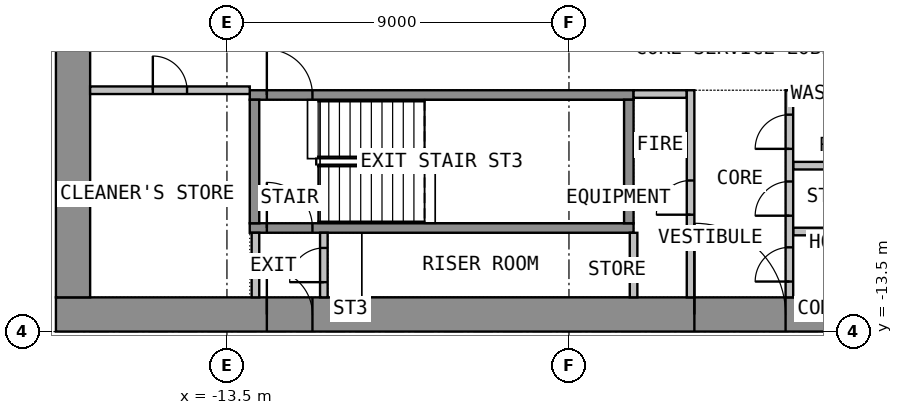
"""IFC4 building model, lengths in metres.
Left out: names, types, materials, properties, quantities, classifications, styles, units other than length and angle.
Written with IfcOpenShell. Run it as: python <this file> out.ifc"""

import sys

from ifc_helpers import new_model, si_unit, direction, frame, frame_2d, origin, place, context, subcontext, project, spatial, rectangle, extrude, element, fill, save


model = new_model("IFC4")
c1 = context("Model", 3, precision=1e-05, world=origin(), true_north=direction((0.0, 1.0)))
c2 = subcontext(c1, "Body", "Model", "MODEL_VIEW")
j1 = project(units=[si_unit("LENGTHUNIT", "METRE"), si_unit("PLANEANGLEUNIT", "RADIAN")], contexts=[c1])
p1 = place(None, origin())
s1 = spatial("IfcSite", under=j1, at=p1, CompositionType="ELEMENT")
p2 = place(p1, origin())
s2 = spatial("IfcBuilding", under=s1, at=p2, CompositionType="ELEMENT")
p3 = place(p2, frame((0.0, 0.0, 30.0)))
s3 = spatial("IfcBuildingStorey", under=s2, at=p3, CompositionType="ELEMENT", Elevation=30.0)
p4 = place(p3, frame((-18.0, -13.05, 0.0), z_axis=(0.0, 0.0, 1.0), x_axis=(1.0, 0.0, 0.0)))
e1 = element("IfcWall", 1, at=p4, inside=s3, PredefinedType="SHEAR", context=c2, shape_type="SweptSolid", body=[
    extrude(rectangle(XDim=36.0, YDim=0.9, at=frame_2d((18.0, 0.0))), origin(), (0.0, 0.0, 1.0), 3.525),
])
p5 = place(p4, frame((16.8, 0.0, 0.0)))
e2 = element("IfcOpeningElement", 2, at=p5, cuts=e1, PredefinedType="OPENING", context=c2, shape_type="SweptSolid", body=[
    extrude(rectangle(XDim=2.4, YDim=2.1, at=frame_2d((1.2, 1.05))), frame((0.0, 0.46, 0.0), z_axis=(0.0, -1.0, 0.0), x_axis=(1.0, 0.0, 0.0)), (0.0, 0.0, 1.0), 0.92),
])
p6 = place(p4, frame((5.55, 0.0, 0.0)))
e3 = element("IfcOpeningElement", 3, at=p6, cuts=e1, PredefinedType="OPENING", context=c2, shape_type="SweptSolid", body=[
    extrude(rectangle(XDim=1.2, YDim=2.1, at=frame_2d((0.6, 1.05))), frame((0.0, 0.46, 0.0), z_axis=(0.0, -1.0, 0.0), x_axis=(1.0, 0.0, 0.0)), (0.0, 0.0, 1.0), 0.92),
])
p7 = place(p4, frame((29.25, 0.0, 0.0)))
e4 = element("IfcOpeningElement", 4, at=p7, cuts=e1, PredefinedType="OPENING", context=c2, shape_type="SweptSolid", body=[
    extrude(rectangle(XDim=1.2, YDim=2.1, at=frame_2d((0.6, 1.05))), frame((0.0, 0.46, 0.0), z_axis=(0.0, -1.0, 0.0), x_axis=(1.0, 0.0, 0.0)), (0.0, 0.0, 1.0), 0.92),
])
p8 = place(p3, frame((-17.55, -12.6, 0.0), z_axis=(0.0, 0.0, 1.0), x_axis=(0.0, 1.0, 0.0)))
e5 = element("IfcWall", 5, at=p8, inside=s3, PredefinedType="SHEAR", context=c2, shape_type="SweptSolid", body=[
    extrude(rectangle(XDim=25.2, YDim=0.9, at=frame_2d((12.6, 0.0))), origin(), (0.0, 0.0, 1.0), 3.525),
])
p9 = place(p8, frame((11.4, 0.0, 0.0)))
e6 = element("IfcOpeningElement", 6, at=p9, cuts=e5, PredefinedType="OPENING", context=c2, shape_type="SweptSolid", body=[
    extrude(rectangle(XDim=2.4, YDim=2.1, at=frame_2d((1.2, 1.05))), frame((0.0, 0.46, 0.0), z_axis=(0.0, -1.0, 0.0), x_axis=(1.0, 0.0, 0.0)), (0.0, 0.0, 1.0), 0.92),
])
p10 = place(p3, frame((-12.9, -10.775, 0.0), z_axis=(0.0, 0.0, 1.0), x_axis=(1.0, 0.0, 0.0)))
e7 = element("IfcWall", 7, at=p10, inside=s3, PredefinedType="SHEAR", context=c2, shape_type="SweptSolid", body=[
    extrude(rectangle(XDim=10.1, YDim=0.25, at=frame_2d((5.05, 0.0))), origin(), (0.0, 0.0, 1.0), 3.525),
])
p11 = place(p10, frame((0.45, 0.0, 0.0)))
e8 = element("IfcOpeningElement", 8, at=p11, cuts=e7, PredefinedType="OPENING", context=c2, shape_type="SweptSolid", body=[
    extrude(rectangle(XDim=1.2, YDim=2.1, at=frame_2d((0.6, 1.05))), frame((0.0, 0.135, 0.0), z_axis=(0.0, -1.0, 0.0), x_axis=(1.0, 0.0, 0.0)), (0.0, 0.0, 1.0), 0.27),
])
p12 = place(p3, frame((-12.9, -7.275, 0.0), z_axis=(0.0, 0.0, 1.0), x_axis=(1.0, 0.0, 0.0)))
e9 = element("IfcWall", 9, at=p12, inside=s3, PredefinedType="SHEAR", context=c2, shape_type="SweptSolid", body=[
    extrude(rectangle(XDim=10.1, YDim=0.25, at=frame_2d((5.05, 0.0))), origin(), (0.0, 0.0, 1.0), 3.525),
])
p13 = place(p12, frame((0.45, 0.0, 0.0)))
e10 = element("IfcOpeningElement", 10, at=p13, cuts=e9, PredefinedType="OPENING", context=c2, shape_type="SweptSolid", body=[
    extrude(rectangle(XDim=1.2, YDim=2.1, at=frame_2d((0.6, 1.05))), frame((0.0, 0.135, 0.0), z_axis=(0.0, -1.0, 0.0), x_axis=(1.0, 0.0, 0.0)), (0.0, 0.0, 1.0), 0.27),
])
for number, where, z_axis, x_axis in (
    (11, (-12.775, -10.65, 0.0), (0.0, 0.0, 1.0), (0.0, 1.0, 0.0)),
    (12, (-2.925, -10.65, 0.0), (0.0, 0.0, 1.0), (0.0, 1.0, 0.0)),
):
    element("IfcWall", number, at=place(p3, frame(where, z_axis=z_axis, x_axis=x_axis)), inside=s3, PredefinedType="SHEAR", context=c2, shape_type="SweptSolid", body=[
        extrude(rectangle(XDim=3.25, YDim=0.25, at=frame_2d((1.625, 0.0))), origin(), (0.0, 0.0, 1.0), 3.525),
    ])
for number, where, z_axis, x_axis in (
    (13, (-2.8, -7.25, 0.0), (0.0, 0.0, 1.0), (1.0, 0.0, 0.0)),
    (14, (1.4, -7.25, 0.0), (0.0, 0.0, 1.0), (1.0, 0.0, 0.0)),
    (15, (1.4, -9.135, 0.0), (0.0, 0.0, 1.0), (1.0, 0.0, 0.0)),
    (16, (1.4, -10.867, 0.0), (0.0, 0.0, 1.0), (1.0, 0.0, 0.0)),
):
    element("IfcWall", number, at=place(p3, frame(where, z_axis=z_axis, x_axis=x_axis)), inside=s3, PredefinedType="PARTITIONING", context=c2, shape_type="SweptSolid", body=[
        extrude(rectangle(XDim=1.4, YDim=0.2, at=frame_2d((0.7, 0.0))), origin(), (0.0, 0.0, 1.0), 3.525),
    ])
p14 = place(p3, frame((-1.3, -12.6, 0.0), z_axis=(0.0, 0.0, 1.0), x_axis=(0.0, 1.0, 0.0)))
e17 = element("IfcWall", 17, at=p14, inside=s3, PredefinedType="PARTITIONING", context=c2, shape_type="SweptSolid", body=[
    extrude(rectangle(XDim=5.45, YDim=0.2, at=frame_2d((2.725, 0.0))), origin(), (0.0, 0.0, 1.0), 3.525),
])
p15 = place(p14, frame((2.175, 0.0, 0.0)))
e18 = element("IfcOpeningElement", 18, at=p15, cuts=e17, PredefinedType="OPENING", context=c2, shape_type="SweptSolid", body=[
    extrude(rectangle(XDim=0.9, YDim=2.1, at=frame_2d((0.45, 1.05))), frame((0.0, 0.11, 0.0), z_axis=(0.0, -1.0, 0.0), x_axis=(1.0, 0.0, 0.0)), (0.0, 0.0, 1.0), 0.22),
])
p16 = place(p3, frame((1.3, -12.6, 0.0), z_axis=(0.0, 0.0, 1.0), x_axis=(0.0, 1.0, 0.0)))
e19 = element("IfcWall", 19, at=p16, inside=s3, PredefinedType="PARTITIONING", context=c2, shape_type="SweptSolid", body=[
    extrude(rectangle(XDim=5.45, YDim=0.2, at=frame_2d((2.725, 0.0))), origin(), (0.0, 0.0, 1.0), 3.525),
])
p17 = place(p16, frame((0.416, 0.0, 0.0)))
e20 = element("IfcOpeningElement", 20, at=p17, cuts=e19, PredefinedType="OPENING", context=c2, shape_type="SweptSolid", body=[
    extrude(rectangle(XDim=0.9, YDim=2.1, at=frame_2d((0.45, 1.05))), frame((0.0, 0.11, 0.0), z_axis=(0.0, -1.0, 0.0), x_axis=(1.0, 0.0, 0.0)), (0.0, 0.0, 1.0), 0.22),
])
p18 = place(p16, frame((2.149, 0.0, 0.0)))
e21 = element("IfcOpeningElement", 21, at=p18, cuts=e19, PredefinedType="OPENING", context=c2, shape_type="SweptSolid", body=[
    extrude(rectangle(XDim=0.9, YDim=2.1, at=frame_2d((0.45, 1.05))), frame((0.0, 0.11, 0.0), z_axis=(0.0, -1.0, 0.0), x_axis=(1.0, 0.0, 0.0)), (0.0, 0.0, 1.0), 0.22),
])
p19 = place(p16, frame((3.907, 0.0, 0.0)))
e22 = element("IfcOpeningElement", 22, at=p19, cuts=e19, PredefinedType="OPENING", context=c2, shape_type="SweptSolid", body=[
    extrude(rectangle(XDim=0.9, YDim=2.1, at=frame_2d((0.45, 1.05))), frame((0.0, 0.11, 0.0), z_axis=(0.0, -1.0, 0.0), x_axis=(1.0, 0.0, 0.0)), (0.0, 0.0, 1.0), 0.22),
])
p20 = place(p3, frame((-12.75, -12.6, 0.0), z_axis=(0.0, 0.0, 1.0), x_axis=(0.0, 1.0, 0.0)))
e23 = element("IfcWall", 23, at=p20, inside=s3, PredefinedType="PARTITIONING", context=c2, shape_type="SweptSolid", body=[
    extrude(rectangle(XDim=1.7, YDim=0.2, at=frame_2d((0.85, 0.0))), origin(), (0.0, 0.0, 1.0), 3.525),
])
p21 = place(p3, frame((-10.95, -12.6, 0.0), z_axis=(0.0, 0.0, 1.0), x_axis=(0.0, 1.0, 0.0)))
e24 = element("IfcWall", 24, at=p21, inside=s3, PredefinedType="PARTITIONING", context=c2, shape_type="SweptSolid", body=[
    extrude(rectangle(XDim=1.7, YDim=0.2, at=frame_2d((0.85, 0.0))), origin(), (0.0, 0.0, 1.0), 3.525),
])
p22 = place(p21, frame((0.4, 0.0, 0.0)))
e25 = element("IfcOpeningElement", 25, at=p22, cuts=e24, PredefinedType="OPENING", context=c2, shape_type="SweptSolid", body=[
    extrude(rectangle(XDim=0.9, YDim=2.1, at=frame_2d((0.45, 1.05))), frame((0.0, 0.11, 0.0), z_axis=(0.0, -1.0, 0.0), x_axis=(1.0, 0.0, 0.0)), (0.0, 0.0, 1.0), 0.22),
])
p23 = place(p3, frame((-17.1, -7.15, 0.0), z_axis=(0.0, 0.0, 1.0), x_axis=(1.0, 0.0, 0.0)))
e26 = element("IfcWall", 26, at=p23, inside=s3, PredefinedType="PARTITIONING", context=c2, shape_type="SweptSolid", body=[
    extrude(rectangle(XDim=4.2, YDim=0.2, at=frame_2d((2.1, 0.0))), origin(), (0.0, 0.0, 1.0), 3.525),
])
p24 = place(p23, frame((1.65, 0.0, 0.0)))
e27 = element("IfcOpeningElement", 27, at=p24, cuts=e26, PredefinedType="OPENING", context=c2, shape_type="SweptSolid", body=[
    extrude(rectangle(XDim=0.9, YDim=2.1, at=frame_2d((0.45, 1.05))), frame((0.0, 0.11, 0.0), z_axis=(0.0, -1.0, 0.0), x_axis=(1.0, 0.0, 0.0)), (0.0, 0.0, 1.0), 0.22),
])
p25 = place(p3, frame((-2.8, -12.599, 0.0), z_axis=(0.0, 0.0, 1.0), x_axis=(0.0, 1.0, 0.0)))
e28 = element("IfcWall", 28, at=p25, inside=s3, PredefinedType="PARTITIONING", context=c2, shape_type="SweptSolid", body=[
    extrude(rectangle(XDim=1.698, YDim=0.2, at=frame_2d((0.849, 0.0))), origin(), (0.0, 0.0, 1.0), 3.525),
])
p26 = place(p5, origin())
e29 = element("IfcDoor", 29, at=p26, inside=s3, OperationType="DOUBLE_DOOR_DOUBLE_SWING", PredefinedType="DOOR", context=c2, shape_type="SweptSolid", body=[
    extrude(rectangle(XDim=2.4, YDim=2.1, at=frame_2d((1.2, 1.05))), frame((0.0, 0.025, 0.0), z_axis=(0.0, -1.0, 0.0), x_axis=(1.0, 0.0, 0.0)), (0.0, 0.0, 1.0), 0.05),
])
fill(e2, e29)
p27 = place(p6, origin())
e30 = element("IfcDoor", 30, at=p27, inside=s3, OperationType="SINGLE_SWING_RIGHT", PredefinedType="DOOR", context=c2, shape_type="SweptSolid", body=[
    extrude(rectangle(XDim=1.2, YDim=2.1, at=frame_2d((0.6, 1.05))), frame((0.0, 0.025, 0.0), z_axis=(0.0, -1.0, 0.0), x_axis=(1.0, 0.0, 0.0)), (0.0, 0.0, 1.0), 0.05),
])
fill(e3, e30)
p28 = place(p13, origin())
e31 = element("IfcDoor", 31, at=p28, inside=s3, OperationType="SINGLE_SWING_LEFT", PredefinedType="DOOR", context=c2, shape_type="SweptSolid", body=[
    extrude(rectangle(XDim=1.2, YDim=2.1, at=frame_2d((0.6, 1.05))), frame((0.0, 0.025, 0.0), z_axis=(0.0, -1.0, 0.0), x_axis=(1.0, 0.0, 0.0)), (0.0, 0.0, 1.0), 0.05),
])
fill(e10, e31)
p29 = place(p15, origin())
e32 = element("IfcDoor", 32, at=p29, inside=s3, OperationType="SINGLE_SWING_LEFT", PredefinedType="DOOR", context=c2, shape_type="SweptSolid", body=[
    extrude(rectangle(XDim=0.9, YDim=2.1, at=frame_2d((0.45, 1.05))), frame((0.0, 0.025, 0.0), z_axis=(0.0, -1.0, 0.0), x_axis=(1.0, 0.0, 0.0)), (0.0, 0.0, 1.0), 0.05),
])
fill(e18, e32)
p30 = place(p17, origin())
e33 = element("IfcDoor", 33, at=p30, inside=s3, OperationType="SINGLE_SWING_LEFT", PredefinedType="DOOR", context=c2, shape_type="SweptSolid", body=[
    extrude(rectangle(XDim=0.9, YDim=2.1, at=frame_2d((0.45, 1.05))), frame((0.0, 0.025, 0.0), z_axis=(0.0, -1.0, 0.0), x_axis=(1.0, 0.0, 0.0)), (0.0, 0.0, 1.0), 0.05),
])
fill(e20, e33)
p31 = place(p18, origin())
e34 = element("IfcDoor", 34, at=p31, inside=s3, OperationType="SINGLE_SWING_LEFT", PredefinedType="DOOR", context=c2, shape_type="SweptSolid", body=[
    extrude(rectangle(XDim=0.9, YDim=2.1, at=frame_2d((0.45, 1.05))), frame((0.0, 0.025, 0.0), z_axis=(0.0, -1.0, 0.0), x_axis=(1.0, 0.0, 0.0)), (0.0, 0.0, 1.0), 0.05),
])
fill(e21, e34)
p32 = place(p19, origin())
e35 = element("IfcDoor", 35, at=p32, inside=s3, OperationType="SINGLE_SWING_LEFT", PredefinedType="DOOR", context=c2, shape_type="SweptSolid", body=[
    extrude(rectangle(XDim=0.9, YDim=2.1, at=frame_2d((0.45, 1.05))), frame((0.0, 0.025, 0.0), z_axis=(0.0, -1.0, 0.0), x_axis=(1.0, 0.0, 0.0)), (0.0, 0.0, 1.0), 0.05),
])
fill(e22, e35)
p33 = place(p11, origin())
e36 = element("IfcDoor", 36, at=p33, inside=s3, OperationType="SINGLE_SWING_RIGHT", PredefinedType="DOOR", context=c2, shape_type="SweptSolid", body=[
    extrude(rectangle(XDim=1.2, YDim=2.1, at=frame_2d((0.6, 1.05))), frame((0.0, 0.025, 0.0), z_axis=(0.0, -1.0, 0.0), x_axis=(1.0, 0.0, 0.0)), (0.0, 0.0, 1.0), 0.05),
])
fill(e8, e36)
p34 = place(p22, origin())
e37 = element("IfcDoor", 37, at=p34, inside=s3, OperationType="SINGLE_SWING_LEFT", PredefinedType="DOOR", context=c2, shape_type="SweptSolid", body=[
    extrude(rectangle(XDim=0.9, YDim=2.1, at=frame_2d((0.45, 1.05))), frame((0.0, 0.025, 0.0), z_axis=(0.0, -1.0, 0.0), x_axis=(1.0, 0.0, 0.0)), (0.0, 0.0, 1.0), 0.05),
])
fill(e25, e37)
p35 = place(p24, origin())
e38 = element("IfcDoor", 38, at=p35, inside=s3, OperationType="SINGLE_SWING_LEFT", PredefinedType="DOOR", context=c2, shape_type="SweptSolid", body=[
    extrude(rectangle(XDim=0.9, YDim=2.1, at=frame_2d((0.45, 1.05))), frame((0.0, 0.025, 0.0), z_axis=(0.0, -1.0, 0.0), x_axis=(1.0, 0.0, 0.0)), (0.0, 0.0, 1.0), 0.05),
])
fill(e27, e38)
save(model, sys.argv[1])
